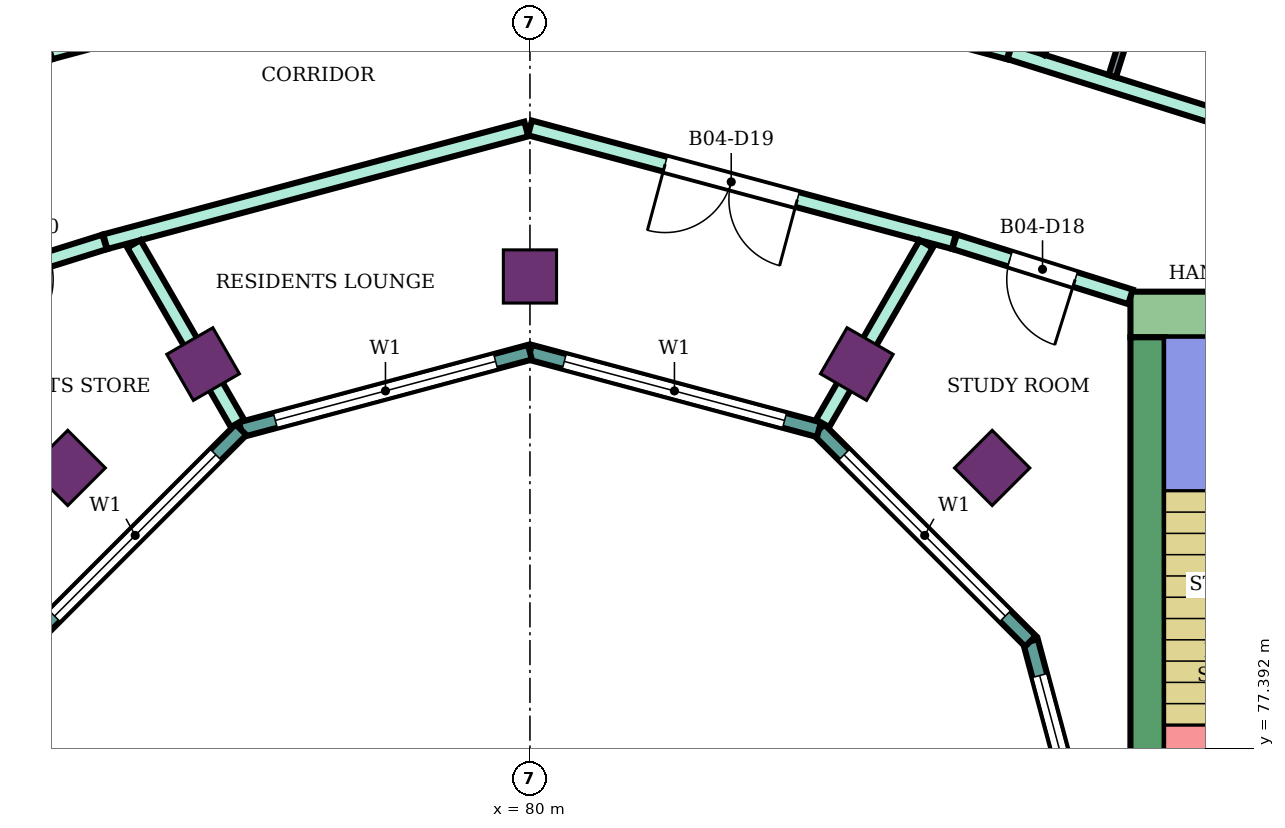
"""IFC4 building model, lengths in metres.
Left out: names, types, materials, properties, quantities, classifications, styles, units other than length and angle.
Written with IfcOpenShell. Run it as: python <this file> out.ifc"""

import sys

from ifc_helpers import new_model, si_unit, direction, frame, frame_2d, origin, origin_2d, place, context, subcontext, project, spatial, rectangle, extrude, element, fill, save


model = new_model("IFC4")
c1 = context("Model", 3, precision=1e-05, world=origin(), true_north=direction((0.0, 1.0)))
c2 = subcontext(c1, "Body", "Model", "MODEL_VIEW")
j1 = project(units=[si_unit("LENGTHUNIT", "METRE"), si_unit("PLANEANGLEUNIT", "RADIAN")], contexts=[c1])
p1 = place(None, origin())
s1 = spatial("IfcSite", under=j1, at=p1, CompositionType="ELEMENT")
p2 = place(p1, origin())
s2 = spatial("IfcBuilding", under=s1, at=p2, CompositionType="ELEMENT")
p3 = place(p2, frame((0.0, 0.0, 249.9)))
s3 = spatial("IfcBuildingStorey", under=s2, at=p3, CompositionType="ELEMENT", Elevation=249.9)
for number, where, z_axis, x_axis in (
    (1, (86.081, 81.081, 0.0), (0.0, 0.0, 1.0), (0.707, 0.707, 0.0)),
    (2, (84.3, 82.448, 0.0), (0.0, 0.0, 1.0), (0.5, 0.866, 0.0)),
    (3, (80.0, 83.6, 0.0), (0.0, 0.0, 1.0), (0.0, 1.0, 0.0)),
    (4, (75.7, 82.448, 0.0), (0.0, 0.0, 1.0), (-0.5, 0.866, 0.0)),
    (5, (73.919, 81.081, 0.0), (0.0, 0.0, 1.0), (-0.707, 0.707, 0.0)),
):
    element("IfcColumn", number, at=place(p3, frame(where, z_axis=z_axis, x_axis=x_axis)), inside=s3, PredefinedType="COLUMN", context=c2, shape_type="SweptSolid", body=[
        extrude(rectangle(XDim=0.7, YDim=0.7, at=origin_2d()), origin(), (0.0, 0.0, 1.0), 4.2),
    ])
p4 = place(p3, frame((87.9, 83.1, 0.0), z_axis=(0.0, 0.0, 1.0), x_axis=(1.0, 0.0, 0.0)))
e6 = element("IfcWall", 6, at=p4, inside=s3, PredefinedType="SHEAR", context=c2, shape_type="SweptSolid", body=[
    extrude(rectangle(XDim=14.9, YDim=0.6, at=frame_2d((7.45, 0.0))), origin(), (0.0, 0.0, 1.0), 3.88),
])
p5 = place(p4, frame((4.2, 0.0, 0.0)))
e7 = element("IfcOpeningElement", 7, at=p5, cuts=e6, PredefinedType="OPENING", context=c2, shape_type="SweptSolid", body=[
    extrude(rectangle(XDim=2.4, YDim=2.4, at=frame_2d((1.2, 1.2))), frame((0.0, 0.31, 0.0), z_axis=(0.0, -1.0, 0.0), x_axis=(1.0, 0.0, 0.0)), (0.0, 0.0, 1.0), 0.62),
])
p6 = place(p3, frame((88.125, 75.0, 0.0), z_axis=(0.0, 0.0, 1.0), x_axis=(0.0, 1.0, 0.0)))
e8 = element("IfcWall", 8, at=p6, inside=s3, PredefinedType="SHEAR", context=c2, shape_type="SweptSolid", body=[
    extrude(rectangle(XDim=7.8, YDim=0.45, at=frame_2d((3.9, 0.0))), origin(), (0.0, 0.0, 1.0), 3.88),
])
p7 = place(p3, frame((87.604, 75.0, 0.0), z_axis=(0.0, 0.0, 1.0), x_axis=(-0.258789828301, 0.965933654434, 0.0)))
e9 = element("IfcWall", 9, at=p7, inside=s3, PredefinedType="NOTDEFINED", context=c2, shape_type="SweptSolid", body=[
    extrude(rectangle(XDim=3.936, YDim=0.2, at=frame_2d((1.968, 0.0))), origin(), (0.0, 0.0, 1.0), 4.2),
])
p8 = place(p7, frame((0.468, 0.0, 0.9)))
e10 = element("IfcOpeningElement", 10, at=p8, cuts=e9, PredefinedType="OPENING", context=c2, shape_type="SweptSolid", body=[
    extrude(rectangle(XDim=3.0, YDim=2.3, at=frame_2d((1.5, 1.15))), frame((0.0, 0.11, 0.0), z_axis=(0.0, -1.0, 0.0), x_axis=(1.0, 0.0, 0.0)), (0.0, 0.0, 1.0), 0.22),
])
p9 = place(p3, frame((86.585, 78.802, 0.0), z_axis=(0.0, 0.0, 1.0), x_axis=(-0.707106781187, 0.707106781187, 0.0)))
e11 = element("IfcWall", 11, at=p9, inside=s3, PredefinedType="NOTDEFINED", context=c2, shape_type="SweptSolid", body=[
    extrude(rectangle(XDim=3.936, YDim=0.2, at=frame_2d((1.968, 0.0))), origin(), (0.0, 0.0, 1.0), 4.2),
])
p10 = place(p9, frame((0.468, 0.0, 0.9)))
e12 = element("IfcOpeningElement", 12, at=p10, cuts=e11, PredefinedType="OPENING", context=c2, shape_type="SweptSolid", body=[
    extrude(rectangle(XDim=3.0, YDim=2.3, at=frame_2d((1.5, 1.15))), frame((0.0, 0.11, 0.0), z_axis=(0.0, -1.0, 0.0), x_axis=(1.0, 0.0, 0.0)), (0.0, 0.0, 1.0), 0.22),
])
p11 = place(p3, frame((83.802, 81.585, 0.0), z_axis=(0.0, 0.0, 1.0), x_axis=(-0.965933654434, 0.258789828301, 0.0)))
e13 = element("IfcWall", 13, at=p11, inside=s3, PredefinedType="NOTDEFINED", context=c2, shape_type="SweptSolid", body=[
    extrude(rectangle(XDim=3.936, YDim=0.2, at=frame_2d((1.968, 0.0))), origin(), (0.0, 0.0, 1.0), 4.2),
])
p12 = place(p11, frame((0.468, 0.0, 0.9)))
e14 = element("IfcOpeningElement", 14, at=p12, cuts=e13, PredefinedType="OPENING", context=c2, shape_type="SweptSolid", body=[
    extrude(rectangle(XDim=3.0, YDim=2.3, at=frame_2d((1.5, 1.15))), frame((0.0, 0.11, 0.0), z_axis=(0.0, -1.0, 0.0), x_axis=(1.0, 0.0, 0.0)), (0.0, 0.0, 1.0), 0.22),
])
p13 = place(p3, frame((80.0, 82.604, 0.0), z_axis=(0.0, 0.0, 1.0), x_axis=(-0.965933654434, -0.258789828301, 0.0)))
e15 = element("IfcWall", 15, at=p13, inside=s3, PredefinedType="NOTDEFINED", context=c2, shape_type="SweptSolid", body=[
    extrude(rectangle(XDim=3.936, YDim=0.2, at=frame_2d((1.968, 0.0))), origin(), (0.0, 0.0, 1.0), 4.2),
])
p14 = place(p13, frame((0.468, 0.0, 0.9)))
e16 = element("IfcOpeningElement", 16, at=p14, cuts=e15, PredefinedType="OPENING", context=c2, shape_type="SweptSolid", body=[
    extrude(rectangle(XDim=3.0, YDim=2.3, at=frame_2d((1.5, 1.15))), frame((0.0, 0.11, 0.0), z_axis=(0.0, -1.0, 0.0), x_axis=(1.0, 0.0, 0.0)), (0.0, 0.0, 1.0), 0.22),
])
p15 = place(p3, frame((76.198, 81.585, 0.0), z_axis=(0.0, 0.0, 1.0), x_axis=(-0.707106781187, -0.707106781187, 0.0)))
e17 = element("IfcWall", 17, at=p15, inside=s3, PredefinedType="NOTDEFINED", context=c2, shape_type="SweptSolid", body=[
    extrude(rectangle(XDim=3.936, YDim=0.2, at=frame_2d((1.968, 0.0))), origin(), (0.0, 0.0, 1.0), 4.2),
])
p16 = place(p15, frame((0.468, 0.0, 0.9)))
e18 = element("IfcOpeningElement", 18, at=p16, cuts=e17, PredefinedType="OPENING", context=c2, shape_type="SweptSolid", body=[
    extrude(rectangle(XDim=3.0, YDim=2.3, at=frame_2d((1.5, 1.15))), frame((0.0, 0.11, 0.0), z_axis=(0.0, -1.0, 0.0), x_axis=(1.0, 0.0, 0.0)), (0.0, 0.0, 1.0), 0.22),
])
p17 = place(p3, frame((72.1, 83.332, 0.0), z_axis=(0.0, 0.0, 1.0), x_axis=(0.954233106619, 0.299063836383, 0.0)))
e19 = element("IfcWall", 19, at=p17, inside=s3, PredefinedType="PARTITIONING", context=c2, shape_type="SweptSolid", body=[
    extrude(rectangle(XDim=2.414, YDim=0.2, at=frame_2d((1.207, 0.0))), origin(), (0.0, 0.0, 1.0), 3.75),
])
p18 = place(p17, frame((0.762, 0.0, 0.0)))
e20 = element("IfcOpeningElement", 20, at=p18, cuts=e19, PredefinedType="OPENING", context=c2, shape_type="SweptSolid", body=[
    extrude(rectangle(XDim=0.9, YDim=2.1, at=frame_2d((0.45, 1.05))), frame((0.0, 0.11, 0.0), z_axis=(0.0, -1.0, 0.0), x_axis=(1.0, 0.0, 0.0)), (0.0, 0.0, 1.0), 0.22),
])
p19 = place(p3, frame((73.687, 86.554, 0.0), z_axis=(0.0, 0.0, 1.0), x_axis=(0.965961994098, 0.258684027257, 0.0)))
e21 = element("IfcWall", 21, at=p19, inside=s3, PredefinedType="PARTITIONING", context=c2, shape_type="SweptSolid", body=[
    extrude(rectangle(XDim=6.486, YDim=0.2, at=frame_2d((3.243, 0.0))), origin(), (0.0, 0.0, 1.0), 3.75),
])
p20 = place(p19, frame((0.55, 0.0, 0.0)))
e22 = element("IfcOpeningElement", 22, at=p20, cuts=e21, PredefinedType="OPENING", context=c2, shape_type="SweptSolid", body=[
    extrude(rectangle(XDim=1.0, YDim=2.1, at=frame_2d((0.5, 1.05))), frame((0.0, 0.11, 0.0), z_axis=(0.0, -1.0, 0.0), x_axis=(1.0, 0.0, 0.0)), (0.0, 0.0, 1.0), 0.22),
])
p21 = place(p3, frame((74.413, 84.057, 0.0), z_axis=(0.0, 0.0, 1.0), x_axis=(0.965970849692, 0.258650956976, 0.0)))
e23 = element("IfcWall", 23, at=p21, inside=s3, PredefinedType="PARTITIONING", context=c2, shape_type="SweptSolid", body=[
    extrude(rectangle(XDim=5.734, YDim=0.2, at=frame_2d((2.867, 0.0))), origin(), (0.0, 0.0, 1.0), 3.75),
])
p22 = place(p3, frame((74.79, 84.028, 0.0), z_axis=(0.0, 0.0, 1.0), x_axis=(0.499859501914, -0.866106505198, 0.0)))
e24 = element("IfcWall", 24, at=p22, inside=s3, PredefinedType="PARTITIONING", context=c2, shape_type="SweptSolid", body=[
    extrude(rectangle(XDim=2.724, YDim=0.2, at=frame_2d((1.362, 0.0))), origin(), (0.0, 0.0, 1.0), 3.75),
])
p23 = place(p3, frame((80.0, 85.554, 0.0), z_axis=(0.0, 0.0, 1.0), x_axis=(0.965894438951, -0.258936155845, 0.0)))
e25 = element("IfcWall", 25, at=p23, inside=s3, PredefinedType="PARTITIONING", context=c2, shape_type="SweptSolid", body=[
    extrude(rectangle(XDim=5.774, YDim=0.2, at=frame_2d((2.887, 0.0))), origin(), (0.0, 0.0, 1.0), 3.75),
])
p24 = place(p23, frame((1.841, 0.0, 0.0)))
e26 = element("IfcOpeningElement", 26, at=p24, cuts=e25, PredefinedType="OPENING", context=c2, shape_type="SweptSolid", body=[
    extrude(rectangle(XDim=1.8, YDim=2.1, at=frame_2d((0.9, 1.05))), frame((0.0, 0.11, 0.0), z_axis=(0.0, -1.0, 0.0), x_axis=(1.0, 0.0, 0.0)), (0.0, 0.0, 1.0), 0.22),
])
p25 = place(p3, frame((80.048, 88.233, 0.0), z_axis=(0.0, 0.0, 1.0), x_axis=(0.965787353661, -0.259335280109, 0.0)))
e27 = element("IfcWall", 27, at=p25, inside=s3, PredefinedType="PARTITIONING", context=c2, shape_type="SweptSolid", body=[
    extrude(rectangle(XDim=6.476, YDim=0.2, at=frame_2d((3.238, 0.0))), origin(), (0.0, 0.0, 1.0), 3.75),
])
p26 = place(p25, frame((4.936, 0.0, 0.0)))
e28 = element("IfcOpeningElement", 28, at=p26, cuts=e27, PredefinedType="OPENING", context=c2, shape_type="SweptSolid", body=[
    extrude(rectangle(XDim=1.0, YDim=2.1, at=frame_2d((0.5, 1.05))), frame((0.0, 0.11, 0.0), z_axis=(0.0, -1.0, 0.0), x_axis=(1.0, 0.0, 0.0)), (0.0, 0.0, 1.0), 0.22),
])
p27 = place(p3, frame((83.85, 81.668, 0.0), z_axis=(0.0, 0.0, 1.0), x_axis=(0.500099931433, 0.865967700657, 0.0)))
e29 = element("IfcWall", 29, at=p27, inside=s3, PredefinedType="PARTITIONING", context=c2, shape_type="SweptSolid", body=[
    extrude(rectangle(XDim=2.725, YDim=0.2, at=frame_2d((1.362, 0.0))), origin(), (0.0, 0.0, 1.0), 3.75),
])
p28 = place(p3, frame((85.587, 84.057, 0.0), z_axis=(0.0, 0.0, 1.0), x_axis=(0.954239513179, -0.299043393987, 0.0)))
e30 = element("IfcWall", 30, at=p28, inside=s3, PredefinedType="PARTITIONING", context=c2, shape_type="SweptSolid", body=[
    extrude(rectangle(XDim=2.424, YDim=0.2, at=frame_2d((1.212, 0.0))), origin(), (0.0, 0.0, 1.0), 3.75),
])
p29 = place(p28, frame((0.762, 0.0, 0.0)))
e31 = element("IfcOpeningElement", 31, at=p29, cuts=e30, PredefinedType="OPENING", context=c2, shape_type="SweptSolid", body=[
    extrude(rectangle(XDim=0.9, YDim=2.1, at=frame_2d((0.45, 1.05))), frame((0.0, 0.11, 0.0), z_axis=(0.0, -1.0, 0.0), x_axis=(1.0, 0.0, 0.0)), (0.0, 0.0, 1.0), 0.22),
])
p30 = place(p3, frame((86.313, 86.554, 0.0), z_axis=(0.0, 0.0, 1.0), x_axis=(0.954077387881, -0.29956024091, 0.0)))
e32 = element("IfcWall", 32, at=p30, inside=s3, PredefinedType="PARTITIONING", context=c2, shape_type="SweptSolid", body=[
    extrude(rectangle(XDim=5.72, YDim=0.2, at=frame_2d((2.86, 0.0))), origin(), (0.0, 0.0, 1.0), 3.75),
])
p31 = place(p3, frame((86.677, 86.562, 0.0), z_axis=(0.0, 0.0, 1.0), x_axis=(0.500139020429, 0.865945125424, 0.0)))
e33 = element("IfcWall", 33, at=p31, inside=s3, PredefinedType="PARTITIONING", context=c2, shape_type="SweptSolid", body=[
    extrude(rectangle(XDim=12.446, YDim=0.2, at=frame_2d((6.223, 0.0))), origin(), (0.0, 0.0, 1.0), 3.75),
])
p32 = place(p3, frame((87.661, 86.236, 0.0), z_axis=(0.0, 0.0, 1.0), x_axis=(0.299267255743, 0.954169329648, 0.0)))
e34 = element("IfcWall", 34, at=p32, inside=s3, PredefinedType="PARTITIONING", context=c2, shape_type="SweptSolid", body=[
    extrude(rectangle(XDim=3.95, YDim=0.1, at=frame_2d((1.975, 0.0))), origin(), (0.0, 0.0, 1.0), 3.75),
])
p33 = place(p8, origin())
e35 = element("IfcWindow", 35, at=p33, inside=s3, PartitioningType="SINGLE_PANEL", PredefinedType="WINDOW", context=c2, shape_type="SweptSolid", body=[
    extrude(rectangle(XDim=3.0, YDim=2.3, at=frame_2d((1.5, 1.15))), frame((0.0, 0.03, 0.0), z_axis=(0.0, -1.0, 0.0), x_axis=(1.0, 0.0, 0.0)), (0.0, 0.0, 1.0), 0.06),
])
fill(e10, e35)
p34 = place(p10, origin())
e36 = element("IfcWindow", 36, at=p34, inside=s3, PartitioningType="SINGLE_PANEL", PredefinedType="WINDOW", context=c2, shape_type="SweptSolid", body=[
    extrude(rectangle(XDim=3.0, YDim=2.3, at=frame_2d((1.5, 1.15))), frame((0.0, 0.03, 0.0), z_axis=(0.0, -1.0, 0.0), x_axis=(1.0, 0.0, 0.0)), (0.0, 0.0, 1.0), 0.06),
])
fill(e12, e36)
p35 = place(p12, origin())
e37 = element("IfcWindow", 37, at=p35, inside=s3, PartitioningType="SINGLE_PANEL", PredefinedType="WINDOW", context=c2, shape_type="SweptSolid", body=[
    extrude(rectangle(XDim=3.0, YDim=2.3, at=frame_2d((1.5, 1.15))), frame((0.0, 0.03, 0.0), z_axis=(0.0, -1.0, 0.0), x_axis=(1.0, 0.0, 0.0)), (0.0, 0.0, 1.0), 0.06),
])
fill(e14, e37)
p36 = place(p14, origin())
e38 = element("IfcWindow", 38, at=p36, inside=s3, PartitioningType="SINGLE_PANEL", PredefinedType="WINDOW", context=c2, shape_type="SweptSolid", body=[
    extrude(rectangle(XDim=3.0, YDim=2.3, at=frame_2d((1.5, 1.15))), frame((0.0, 0.03, 0.0), z_axis=(0.0, -1.0, 0.0), x_axis=(1.0, 0.0, 0.0)), (0.0, 0.0, 1.0), 0.06),
])
fill(e16, e38)
p37 = place(p16, origin())
e39 = element("IfcWindow", 39, at=p37, inside=s3, PartitioningType="SINGLE_PANEL", PredefinedType="WINDOW", context=c2, shape_type="SweptSolid", body=[
    extrude(rectangle(XDim=3.0, YDim=2.3, at=frame_2d((1.5, 1.15))), frame((0.0, 0.03, 0.0), z_axis=(0.0, -1.0, 0.0), x_axis=(1.0, 0.0, 0.0)), (0.0, 0.0, 1.0), 0.06),
])
fill(e18, e39)
p38 = place(p29, frame((0.9, 0.0, 0.0), z_axis=(0.0, 0.0, 1.0), x_axis=(-1.0, 0.0, 0.0)))
e40 = element("IfcDoor", 40, at=p38, inside=s3, OperationType="SINGLE_SWING_LEFT", PredefinedType="DOOR", context=c2, shape_type="SweptSolid", body=[
    extrude(rectangle(XDim=0.9, YDim=2.1, at=frame_2d((0.45, 1.05))), frame((0.0, 0.025, 0.0), z_axis=(0.0, -1.0, 0.0), x_axis=(1.0, 0.0, 0.0)), (0.0, 0.0, 1.0), 0.05),
])
fill(e31, e40)
p39 = place(p24, frame((1.8, 0.0, 0.0), z_axis=(0.0, 0.0, 1.0), x_axis=(-1.0, 0.0, 0.0)))
e41 = element("IfcDoor", 41, at=p39, inside=s3, OperationType="DOUBLE_DOOR_SINGLE_SWING", PredefinedType="DOOR", context=c2, shape_type="SweptSolid", body=[
    extrude(rectangle(XDim=1.8, YDim=2.1, at=frame_2d((0.9, 1.05))), frame((0.0, 0.025, 0.0), z_axis=(0.0, -1.0, 0.0), x_axis=(1.0, 0.0, 0.0)), (0.0, 0.0, 1.0), 0.05),
])
fill(e26, e41)
save(model, sys.argv[1])
